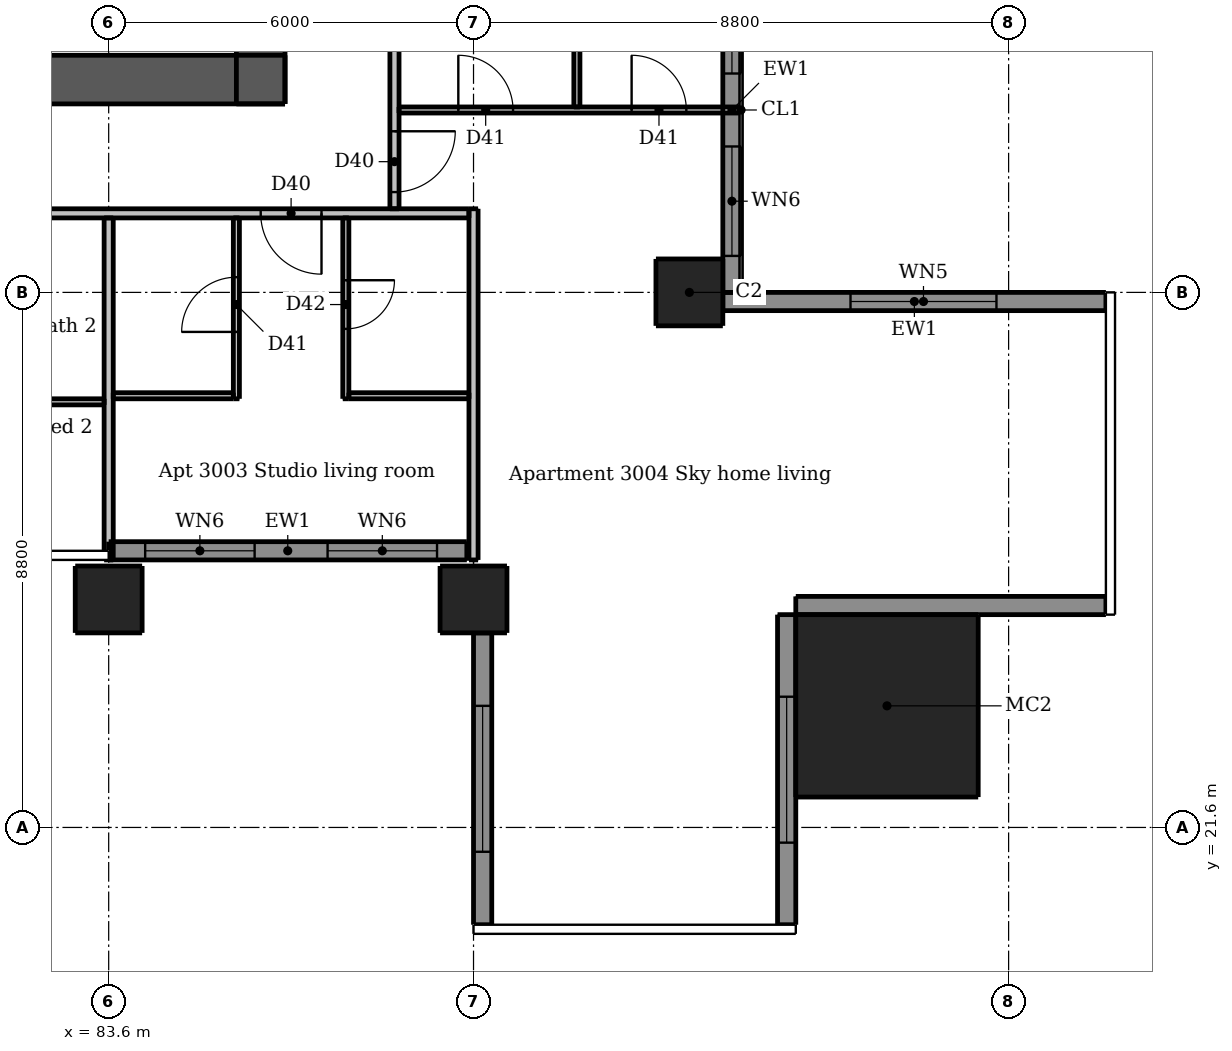
"""IFC4 building model, lengths in metres.
Left out: names, types, materials, properties, quantities, classifications, styles, units other than length and angle.
Written with IfcOpenShell. Run it as: python <this file> out.ifc"""

import sys

from ifc_helpers import new_model, si_unit, direction, frame, frame_2d, origin, origin_2d, place, context, subcontext, project, spatial, rectangle, extrude, element, fill, save


model = new_model("IFC4")
c1 = context("Model", 3, precision=1e-05, world=origin(), true_north=direction((0.0, 1.0)))
c2 = subcontext(c1, "Body", "Model", "MODEL_VIEW")
j1 = project(units=[si_unit("LENGTHUNIT", "METRE"), si_unit("PLANEANGLEUNIT", "RADIAN")], contexts=[c1])
p1 = place(None, origin())
s1 = spatial("IfcSite", under=j1, at=p1, CompositionType="ELEMENT")
p2 = place(p1, origin())
s2 = spatial("IfcBuilding", under=s1, at=p2, CompositionType="ELEMENT")
p3 = place(p2, frame((0.0, 0.0, 111.7)))
s3 = spatial("IfcBuildingStorey", under=s2, at=p3, CompositionType="ELEMENT", Elevation=111.7)
p4 = place(p3, frame((62.5, 33.9, 0.0), z_axis=(0.0, 0.0, 1.0), x_axis=(1.0, 0.0, 0.0)))
e1 = element("IfcWall", 1, at=p4, inside=s3, PredefinedType="SHEAR", context=c2, shape_type="SweptSolid", body=[
    extrude(rectangle(XDim=24.0, YDim=0.8, at=frame_2d((12.0, 0.0))), origin(), (0.0, 0.0, 1.0), 3.05),
])
p5 = place(p4, frame((2.0, 0.0, 0.0)))
e2 = element("IfcOpeningElement", 2, at=p5, cuts=e1, PredefinedType="OPENING", context=c2, shape_type="SweptSolid", body=[
    extrude(rectangle(XDim=1.1, YDim=2.1, at=frame_2d((0.55, 1.05))), frame((0.0, 0.41, 0.0), z_axis=(0.0, -1.0, 0.0), x_axis=(1.0, 0.0, 0.0)), (0.0, 0.0, 1.0), 0.82),
])
p6 = place(p4, frame((20.9, 0.0, 0.0)))
e3 = element("IfcOpeningElement", 3, at=p6, cuts=e1, PredefinedType="OPENING", context=c2, shape_type="SweptSolid", body=[
    extrude(rectangle(XDim=1.1, YDim=2.1, at=frame_2d((0.55, 1.05))), frame((0.0, 0.41, 0.0), z_axis=(0.0, -1.0, 0.0), x_axis=(1.0, 0.0, 0.0)), (0.0, 0.0, 1.0), 0.82),
])
p7 = place(p4, frame((8.0, 0.0, 0.0)))
e4 = element("IfcOpeningElement", 4, at=p7, cuts=e1, PredefinedType="OPENING", context=c2, shape_type="SweptSolid", body=[
    extrude(rectangle(XDim=1.1, YDim=2.1, at=frame_2d((0.55, 1.05))), frame((0.0, 0.41, 0.0), z_axis=(0.0, -1.0, 0.0), x_axis=(1.0, 0.0, 0.0)), (0.0, 0.0, 1.0), 0.82),
])
p8 = place(p4, frame((16.363, 0.0, 0.0)))
e5 = element("IfcOpeningElement", 5, at=p8, cuts=e1, PredefinedType="OPENING", context=c2, shape_type="SweptSolid", body=[
    extrude(rectangle(XDim=0.9, YDim=2.1, at=frame_2d((0.45, 1.05))), frame((0.0, 0.41, 0.0), z_axis=(0.0, -1.0, 0.0), x_axis=(1.0, 0.0, 0.0)), (0.0, 0.0, 1.0), 0.82),
])
p9 = place(p3, frame((86.1, 33.5, 0.0), z_axis=(0.0, 0.0, 1.0), x_axis=(0.0, 1.0, 0.0)))
e6 = element("IfcWall", 6, at=p9, inside=s3, PredefinedType="SHEAR", context=c2, shape_type="SweptSolid", body=[
    extrude(rectangle(XDim=24.0, YDim=0.8, at=frame_2d((12.0, 0.0))), origin(), (0.0, 0.0, 1.0), 3.05),
])
p10 = place(p9, frame((11.2, 0.0, 0.0)))
e7 = element("IfcOpeningElement", 7, at=p10, cuts=e6, PredefinedType="OPENING", context=c2, shape_type="SweptSolid", body=[
    extrude(rectangle(XDim=1.6, YDim=2.1, at=frame_2d((0.8, 1.05))), frame((0.0, 0.41, 0.0), z_axis=(0.0, -1.0, 0.0), x_axis=(1.0, 0.0, 0.0)), (0.0, 0.0, 1.0), 0.82),
])
for number, where, z_axis, x_axis in (
    (8, (83.6, 25.35, 0.0), (0.0, 0.0, 1.0), (1.0, 0.0, 0.0)),
    (9, (89.6, 25.35, 0.0), (0.0, 0.0, 1.0), (1.0, 0.0, 0.0)),
    (10, (93.15, 30.4, 0.0), (0.0, 0.0, 1.0), (1.0, 0.0, 0.0)),
):
    element("IfcColumn", number, at=place(p3, frame(where, z_axis=z_axis, x_axis=x_axis)), inside=s3, PredefinedType="COLUMN", context=c2, shape_type="SweptSolid", body=[
        extrude(rectangle(XDim=1.1, YDim=1.1, at=origin_2d()), origin(), (0.0, 0.0, 1.0), 3.05),
    ])
p11 = place(p3, frame((96.4, 23.6, 0.0), z_axis=(0.0, 0.0, 1.0), x_axis=(1.0, 0.0, 0.0)))
e11 = element("IfcColumn", 11, at=p11, inside=s3, PredefinedType="COLUMN", context=c2, shape_type="SweptSolid", body=[
    extrude(rectangle(XDim=3.0, YDim=3.0, at=origin_2d()), origin(), (0.0, 0.0, 1.0), 3.3),
])
p12 = place(p3, frame((89.75, 24.8, 0.0), z_axis=(0.0, 0.0, 1.0), x_axis=(0.0, -1.0, 0.0)))
e12 = element("IfcWall", 12, at=p12, inside=s3, PredefinedType="SOLIDWALL", context=c2, shape_type="SweptSolid", body=[
    extrude(rectangle(XDim=4.8, YDim=0.3, at=frame_2d((2.4, 0.0))), origin(), (0.0, 0.0, 1.0), 3.05),
])
p13 = place(p12, frame((1.2, 0.0, 0.15)))
e13 = element("IfcOpeningElement", 13, at=p13, cuts=e12, PredefinedType="OPENING", context=c2, shape_type="SweptSolid", body=[
    extrude(rectangle(XDim=2.4, YDim=2.1, at=frame_2d((1.2, 1.05))), frame((0.0, 0.16, 0.0), z_axis=(0.0, -1.0, 0.0), x_axis=(1.0, 0.0, 0.0)), (0.0, 0.0, 1.0), 0.32),
])
p14 = place(p3, frame((94.75, 20.0, 0.0), z_axis=(0.0, 0.0, 1.0), x_axis=(0.0, 1.0, 0.0)))
e14 = element("IfcWall", 14, at=p14, inside=s3, PredefinedType="SOLIDWALL", context=c2, shape_type="SweptSolid", body=[
    extrude(rectangle(XDim=5.1, YDim=0.3, at=frame_2d((2.55, 0.0))), origin(), (0.0, 0.0, 1.0), 3.05),
])
p15 = place(p14, frame((1.35, 0.0, 0.15)))
e15 = element("IfcOpeningElement", 15, at=p15, cuts=e14, PredefinedType="OPENING", context=c2, shape_type="SweptSolid", body=[
    extrude(rectangle(XDim=2.4, YDim=2.1, at=frame_2d((1.2, 1.05))), frame((0.0, 0.16, 0.0), z_axis=(0.0, -1.0, 0.0), x_axis=(1.0, 0.0, 0.0)), (0.0, 0.0, 1.0), 0.32),
])
p16 = place(p3, frame((94.9, 25.25, 0.0), z_axis=(0.0, 0.0, 1.0), x_axis=(1.0, 0.0, 0.0)))
e16 = element("IfcWall", 16, at=p16, inside=s3, PredefinedType="SOLIDWALL", context=c2, shape_type="SweptSolid", body=[
    extrude(rectangle(XDim=5.1, YDim=0.3, at=frame_2d((2.55, 0.0))), origin(), (0.0, 0.0, 1.0), 3.05),
])
p17 = place(p3, frame((100.0, 30.25, 0.0), z_axis=(0.0, 0.0, 1.0), x_axis=(-1.0, 0.0, 0.0)))
e17 = element("IfcWall", 17, at=p17, inside=s3, PredefinedType="SOLIDWALL", context=c2, shape_type="SweptSolid", body=[
    extrude(rectangle(XDim=6.3, YDim=0.3, at=frame_2d((3.15, 0.0))), origin(), (0.0, 0.0, 1.0), 3.05),
])
p18 = place(p17, frame((1.8, 0.0, 0.15)))
e18 = element("IfcOpeningElement", 18, at=p18, cuts=e17, PredefinedType="OPENING", context=c2, shape_type="SweptSolid", body=[
    extrude(rectangle(XDim=2.4, YDim=2.1, at=frame_2d((1.2, 1.05))), frame((0.0, 0.16, 0.0), z_axis=(0.0, -1.0, 0.0), x_axis=(1.0, 0.0, 0.0)), (0.0, 0.0, 1.0), 0.32),
])
p19 = place(p3, frame((83.6, 26.15, 0.0), z_axis=(0.0, 0.0, 1.0), x_axis=(1.0, 0.0, 0.0)))
e19 = element("IfcWall", 19, at=p19, inside=s3, PredefinedType="SOLIDWALL", context=c2, shape_type="SweptSolid", body=[
    extrude(rectangle(XDim=5.89, YDim=0.3, at=frame_2d((2.945, 0.0))), origin(), (0.0, 0.0, 1.0), 3.05),
])
p20 = place(p19, frame((0.6, 0.0, 0.15)))
e20 = element("IfcOpeningElement", 20, at=p20, cuts=e19, PredefinedType="OPENING", context=c2, shape_type="SweptSolid", body=[
    extrude(rectangle(XDim=1.8, YDim=2.1, at=frame_2d((0.9, 1.05))), frame((0.0, 0.16, 0.0), z_axis=(0.0, -1.0, 0.0), x_axis=(1.0, 0.0, 0.0)), (0.0, 0.0, 1.0), 0.32),
])
p21 = place(p19, frame((3.6, 0.0, 0.15)))
e21 = element("IfcOpeningElement", 21, at=p21, cuts=e19, PredefinedType="OPENING", context=c2, shape_type="SweptSolid", body=[
    extrude(rectangle(XDim=1.8, YDim=2.1, at=frame_2d((0.9, 1.05))), frame((0.0, 0.16, 0.0), z_axis=(0.0, -1.0, 0.0), x_axis=(1.0, 0.0, 0.0)), (0.0, 0.0, 1.0), 0.32),
])
p22 = place(p3, frame((93.85, 30.4, 0.0), z_axis=(0.0, 0.0, 1.0), x_axis=(0.0, 1.0, 0.0)))
e22 = element("IfcWall", 22, at=p22, inside=s3, PredefinedType="SOLIDWALL", context=c2, shape_type="SweptSolid", body=[
    extrude(rectangle(XDim=6.0, YDim=0.3, at=frame_2d((3.0, 0.0))), origin(), (0.0, 0.0, 1.0), 3.05),
])
p23 = place(p22, frame((0.6, 0.0, 0.15)))
e23 = element("IfcOpeningElement", 23, at=p23, cuts=e22, PredefinedType="OPENING", context=c2, shape_type="SweptSolid", body=[
    extrude(rectangle(XDim=1.8, YDim=2.1, at=frame_2d((0.9, 1.05))), frame((0.0, 0.16, 0.0), z_axis=(0.0, -1.0, 0.0), x_axis=(1.0, 0.0, 0.0)), (0.0, 0.0, 1.0), 0.32),
])
p24 = place(p22, frame((3.6, 0.0, 0.15)))
e24 = element("IfcOpeningElement", 24, at=p24, cuts=e22, PredefinedType="OPENING", context=c2, shape_type="SweptSolid", body=[
    extrude(rectangle(XDim=1.8, YDim=2.1, at=frame_2d((0.9, 1.05))), frame((0.0, 0.16, 0.0), z_axis=(0.0, -1.0, 0.0), x_axis=(1.0, 0.0, 0.0)), (0.0, 0.0, 1.0), 0.32),
])
p25 = place(p3, frame((85.7, 28.65, 0.0), z_axis=(0.0, 0.0, 1.0), x_axis=(0.0, 1.0, 0.0)))
e25 = element("IfcWall", 25, at=p25, inside=s3, PredefinedType="PARTITIONING", context=c2, shape_type="SweptSolid", body=[
    extrude(rectangle(XDim=2.975, YDim=0.1, at=frame_2d((1.488, 0.0))), origin(), (0.0, 0.0, 1.0), 3.05),
])
p26 = place(p25, frame((1.1, 0.0, 0.0)))
e26 = element("IfcOpeningElement", 26, at=p26, cuts=e25, PredefinedType="OPENING", context=c2, shape_type="SweptSolid", body=[
    extrude(rectangle(XDim=0.9, YDim=2.1, at=frame_2d((0.45, 1.05))), frame((0.0, 0.06, 0.0), z_axis=(0.0, -1.0, 0.0), x_axis=(1.0, 0.0, 0.0)), (0.0, 0.0, 1.0), 0.12),
])
p27 = place(p3, frame((87.5, 31.625, 0.0), z_axis=(0.0, 0.0, 1.0), x_axis=(0.0, -1.0, 0.0)))
e27 = element("IfcWall", 27, at=p27, inside=s3, PredefinedType="PARTITIONING", context=c2, shape_type="SweptSolid", body=[
    extrude(rectangle(XDim=2.975, YDim=0.1, at=frame_2d((1.488, 0.0))), origin(), (0.0, 0.0, 1.0), 3.05),
])
p28 = place(p27, frame((1.025, 0.0, 0.0)))
e28 = element("IfcOpeningElement", 28, at=p28, cuts=e27, PredefinedType="OPENING", context=c2, shape_type="SweptSolid", body=[
    extrude(rectangle(XDim=0.8, YDim=2.1, at=frame_2d((0.4, 1.05))), frame((0.0, 0.06, 0.0), z_axis=(0.0, -1.0, 0.0), x_axis=(1.0, 0.0, 0.0)), (0.0, 0.0, 1.0), 0.12),
])
p29 = place(p3, frame((91.3, 33.45, 0.0), z_axis=(0.0, 0.0, 1.0), x_axis=(0.0, 1.0, 0.0)))
e29 = element("IfcWall", 29, at=p29, inside=s3, PredefinedType="PARTITIONING", context=c2, shape_type="SweptSolid", body=[
    extrude(rectangle(XDim=5.875, YDim=0.1, at=frame_2d((2.938, 0.0))), origin(), (0.0, 0.0, 1.0), 3.05),
])
p30 = place(p29, frame((3.75, 0.0, 0.0)))
e30 = element("IfcOpeningElement", 30, at=p30, cuts=e29, PredefinedType="OPENING", context=c2, shape_type="SweptSolid", body=[
    extrude(rectangle(XDim=0.8, YDim=2.1, at=frame_2d((0.4, 1.05))), frame((0.0, 0.06, 0.0), z_axis=(0.0, -1.0, 0.0), x_axis=(1.0, 0.0, 0.0)), (0.0, 0.0, 1.0), 0.12),
])
p31 = place(p3, frame((88.375, 33.4, 0.0), z_axis=(0.0, 0.0, 1.0), x_axis=(1.0, 0.0, 0.0)))
e31 = element("IfcWall", 31, at=p31, inside=s3, PredefinedType="PARTITIONING", context=c2, shape_type="SweptSolid", body=[
    extrude(rectangle(XDim=5.625, YDim=0.1, at=frame_2d((2.812, 0.0))), origin(), (0.0, 0.0, 1.0), 3.05),
])
p32 = place(p31, frame((0.975, 0.0, 0.0)))
e32 = element("IfcOpeningElement", 32, at=p32, cuts=e31, PredefinedType="OPENING", context=c2, shape_type="SweptSolid", body=[
    extrude(rectangle(XDim=0.9, YDim=2.1, at=frame_2d((0.45, 1.05))), frame((0.0, 0.06, 0.0), z_axis=(0.0, -1.0, 0.0), x_axis=(1.0, 0.0, 0.0)), (0.0, 0.0, 1.0), 0.12),
])
p33 = place(p31, frame((3.825, 0.0, 0.0)))
e33 = element("IfcOpeningElement", 33, at=p33, cuts=e31, PredefinedType="OPENING", context=c2, shape_type="SweptSolid", body=[
    extrude(rectangle(XDim=0.9, YDim=2.1, at=frame_2d((0.45, 1.05))), frame((0.0, 0.06, 0.0), z_axis=(0.0, -1.0, 0.0), x_axis=(1.0, 0.0, 0.0)), (0.0, 0.0, 1.0), 0.12),
])
for number, where, z_axis, x_axis in (
    (34, (83.675, 28.7, 0.0), (0.0, 0.0, 1.0), (1.0, 0.0, 0.0)),
    (35, (87.55, 28.7, 0.0), (0.0, 0.0, 1.0), (1.0, 0.0, 0.0)),
):
    element("IfcWall", number, at=place(p3, frame(where, z_axis=z_axis, x_axis=x_axis)), inside=s3, PredefinedType="PARTITIONING", context=c2, shape_type="SweptSolid", body=[
        extrude(rectangle(XDim=1.975, YDim=0.1, at=frame_2d((0.987, 0.0))), origin(), (0.0, 0.0, 1.0), 3.05),
    ])
p34 = place(p3, frame((78.25, 28.6, 0.0), z_axis=(0.0, 0.0, 1.0), x_axis=(1.0, 0.0, 0.0)))
e36 = element("IfcWall", 36, at=p34, inside=s3, PredefinedType="PARTITIONING", context=c2, shape_type="SweptSolid", body=[
    extrude(rectangle(XDim=5.275, YDim=0.1, at=frame_2d((2.637, 0.0))), origin(), (0.0, 0.0, 1.0), 3.05),
])
p35 = place(p34, frame((3.45, 0.0, 0.0)))
e37 = element("IfcOpeningElement", 37, at=p35, cuts=e36, PredefinedType="OPENING", context=c2, shape_type="SweptSolid", body=[
    extrude(rectangle(XDim=0.8, YDim=2.1, at=frame_2d((0.4, 1.05))), frame((0.0, 0.06, 0.0), z_axis=(0.0, -1.0, 0.0), x_axis=(1.0, 0.0, 0.0)), (0.0, 0.0, 1.0), 0.12),
])
p36 = place(p3, frame((83.6, 26.0, 0.0), z_axis=(0.0, 0.0, 1.0), x_axis=(0.0, 1.0, 0.0)))
e38 = element("IfcWall", 38, at=p36, inside=s3, PredefinedType="PARTITIONING", context=c2, shape_type="SweptSolid", body=[
    extrude(rectangle(XDim=5.625, YDim=0.15, at=frame_2d((2.812, 0.0))), origin(), (0.0, 0.0, 1.0), 2.589),
])
p37 = place(p3, frame((88.3, 60.475, 0.0), z_axis=(0.0, 0.0, 1.0), x_axis=(0.0, -1.0, 0.0)))
e39 = element("IfcWall", 39, at=p37, inside=s3, PredefinedType="PARTITIONING", context=c2, shape_type="SweptSolid", body=[
    extrude(rectangle(XDim=28.7, YDim=0.15, at=frame_2d((14.35, 0.0))), origin(), (0.0, 0.0, 1.0), 3.05),
])
p38 = place(p37, frame((27.425, 0.0, 0.0)))
e40 = element("IfcOpeningElement", 40, at=p38, cuts=e39, PredefinedType="OPENING", context=c2, shape_type="SweptSolid", body=[
    extrude(rectangle(XDim=1.0, YDim=2.1, at=frame_2d((0.5, 1.05))), frame((0.0, 0.085, 0.0), z_axis=(0.0, -1.0, 0.0), x_axis=(1.0, 0.0, 0.0)), (0.0, 0.0, 1.0), 0.17),
])
p39 = place(p37, frame((14.575, 0.0, 0.0)))
e41 = element("IfcOpeningElement", 41, at=p39, cuts=e39, PredefinedType="OPENING", context=c2, shape_type="SweptSolid", body=[
    extrude(rectangle(XDim=1.0, YDim=2.1, at=frame_2d((0.5, 1.05))), frame((0.0, 0.085, 0.0), z_axis=(0.0, -1.0, 0.0), x_axis=(1.0, 0.0, 0.0)), (0.0, 0.0, 1.0), 0.17),
])
p40 = place(p37, frame((2.575, 0.0, 0.0)))
e42 = element("IfcOpeningElement", 42, at=p40, cuts=e39, PredefinedType="OPENING", context=c2, shape_type="SweptSolid", body=[
    extrude(rectangle(XDim=1.0, YDim=2.1, at=frame_2d((0.5, 1.05))), frame((0.0, 0.085, 0.0), z_axis=(0.0, -1.0, 0.0), x_axis=(1.0, 0.0, 0.0)), (0.0, 0.0, 1.0), 0.17),
])
p41 = place(p3, frame((89.6, 26.0, 0.0), z_axis=(0.0, 0.0, 1.0), x_axis=(0.0, 1.0, 0.0)))
e43 = element("IfcWall", 43, at=p41, inside=s3, PredefinedType="PARTITIONING", context=c2, shape_type="SweptSolid", body=[
    extrude(rectangle(XDim=5.775, YDim=0.15, at=frame_2d((2.887, 0.0))), origin(), (0.0, 0.0, 1.0), 2.516),
])
p42 = place(p3, frame((89.525, 31.7, 0.0), z_axis=(0.0, 0.0, 1.0), x_axis=(-1.0, 0.0, 0.0)))
e44 = element("IfcWall", 44, at=p42, inside=s3, PredefinedType="PARTITIONING", context=c2, shape_type="SweptSolid", body=[
    extrude(rectangle(XDim=28.75, YDim=0.15, at=frame_2d((14.375, 0.0))), origin(), (0.0, 0.0, 1.0), 3.05),
])
p43 = place(p42, frame((27.375, 0.0, 0.0)))
e45 = element("IfcOpeningElement", 45, at=p43, cuts=e44, PredefinedType="OPENING", context=c2, shape_type="SweptSolid", body=[
    extrude(rectangle(XDim=1.0, YDim=2.1, at=frame_2d((0.5, 1.05))), frame((0.0, 0.085, 0.0), z_axis=(0.0, -1.0, 0.0), x_axis=(1.0, 0.0, 0.0)), (0.0, 0.0, 1.0), 0.17),
])
p44 = place(p42, frame((12.625, 0.0, 0.0)))
e46 = element("IfcOpeningElement", 46, at=p44, cuts=e44, PredefinedType="OPENING", context=c2, shape_type="SweptSolid", body=[
    extrude(rectangle(XDim=1.0, YDim=2.1, at=frame_2d((0.5, 1.05))), frame((0.0, 0.085, 0.0), z_axis=(0.0, -1.0, 0.0), x_axis=(1.0, 0.0, 0.0)), (0.0, 0.0, 1.0), 0.17),
])
p45 = place(p42, frame((2.425, 0.0, 0.0)))
e47 = element("IfcOpeningElement", 47, at=p45, cuts=e44, PredefinedType="OPENING", context=c2, shape_type="SweptSolid", body=[
    extrude(rectangle(XDim=1.0, YDim=2.1, at=frame_2d((0.5, 1.05))), frame((0.0, 0.085, 0.0), z_axis=(0.0, -1.0, 0.0), x_axis=(1.0, 0.0, 0.0)), (0.0, 0.0, 1.0), 0.17),
])
p46 = place(p13, origin())
e48 = element("IfcWindow", 48, at=p46, inside=s3, PartitioningType="DOUBLE_PANEL_VERTICAL", PredefinedType="WINDOW", context=c2, shape_type="SweptSolid", body=[
    extrude(rectangle(XDim=2.4, YDim=2.1, at=frame_2d((1.2, 1.05))), frame((0.0, 0.03, 0.0), z_axis=(0.0, -1.0, 0.0), x_axis=(1.0, 0.0, 0.0)), (0.0, 0.0, 1.0), 0.06),
])
fill(e13, e48)
p47 = place(p15, origin())
e49 = element("IfcWindow", 49, at=p47, inside=s3, PartitioningType="DOUBLE_PANEL_VERTICAL", PredefinedType="WINDOW", context=c2, shape_type="SweptSolid", body=[
    extrude(rectangle(XDim=2.4, YDim=2.1, at=frame_2d((1.2, 1.05))), frame((0.0, 0.03, 0.0), z_axis=(0.0, -1.0, 0.0), x_axis=(1.0, 0.0, 0.0)), (0.0, 0.0, 1.0), 0.06),
])
fill(e15, e49)
p48 = place(p18, origin())
e50 = element("IfcWindow", 50, at=p48, inside=s3, PartitioningType="DOUBLE_PANEL_VERTICAL", PredefinedType="WINDOW", context=c2, shape_type="SweptSolid", body=[
    extrude(rectangle(XDim=2.4, YDim=2.1, at=frame_2d((1.2, 1.05))), frame((0.0, 0.03, 0.0), z_axis=(0.0, -1.0, 0.0), x_axis=(1.0, 0.0, 0.0)), (0.0, 0.0, 1.0), 0.06),
])
fill(e18, e50)
p49 = place(p20, origin())
e51 = element("IfcWindow", 51, at=p49, inside=s3, PartitioningType="DOUBLE_PANEL_VERTICAL", PredefinedType="WINDOW", context=c2, shape_type="SweptSolid", body=[
    extrude(rectangle(XDim=1.8, YDim=2.1, at=frame_2d((0.9, 1.05))), frame((0.0, 0.03, 0.0), z_axis=(0.0, -1.0, 0.0), x_axis=(1.0, 0.0, 0.0)), (0.0, 0.0, 1.0), 0.06),
])
fill(e20, e51)
p50 = place(p21, origin())
e52 = element("IfcWindow", 52, at=p50, inside=s3, PartitioningType="DOUBLE_PANEL_VERTICAL", PredefinedType="WINDOW", context=c2, shape_type="SweptSolid", body=[
    extrude(rectangle(XDim=1.8, YDim=2.1, at=frame_2d((0.9, 1.05))), frame((0.0, 0.03, 0.0), z_axis=(0.0, -1.0, 0.0), x_axis=(1.0, 0.0, 0.0)), (0.0, 0.0, 1.0), 0.06),
])
fill(e21, e52)
p51 = place(p23, origin())
e53 = element("IfcWindow", 53, at=p51, inside=s3, PartitioningType="DOUBLE_PANEL_VERTICAL", PredefinedType="WINDOW", context=c2, shape_type="SweptSolid", body=[
    extrude(rectangle(XDim=1.8, YDim=2.1, at=frame_2d((0.9, 1.05))), frame((0.0, 0.03, 0.0), z_axis=(0.0, -1.0, 0.0), x_axis=(1.0, 0.0, 0.0)), (0.0, 0.0, 1.0), 0.06),
])
fill(e23, e53)
p52 = place(p24, origin())
e54 = element("IfcWindow", 54, at=p52, inside=s3, PartitioningType="DOUBLE_PANEL_VERTICAL", PredefinedType="WINDOW", context=c2, shape_type="SweptSolid", body=[
    extrude(rectangle(XDim=1.8, YDim=2.1, at=frame_2d((0.9, 1.05))), frame((0.0, 0.03, 0.0), z_axis=(0.0, -1.0, 0.0), x_axis=(1.0, 0.0, 0.0)), (0.0, 0.0, 1.0), 0.06),
])
fill(e24, e54)
p53 = place(p6, origin())
e55 = element("IfcDoor", 55, at=p53, inside=s3, OperationType="SINGLE_SWING_RIGHT", PredefinedType="DOOR", context=c2, shape_type="SweptSolid", body=[
    extrude(rectangle(XDim=1.1, YDim=2.1, at=frame_2d((0.55, 1.05))), frame((0.0, 0.388, 0.0), z_axis=(0.0, -1.0, 0.0), x_axis=(1.0, 0.0, 0.0)), (0.0, 0.0, 1.0), 0.05),
])
fill(e3, e55)
p54 = place(p45, origin())
e56 = element("IfcDoor", 56, at=p54, inside=s3, OperationType="SINGLE_SWING_LEFT", PredefinedType="DOOR", context=c2, shape_type="SweptSolid", body=[
    extrude(rectangle(XDim=1.0, YDim=2.1, at=frame_2d((0.5, 1.05))), frame((0.0, 0.025, 0.0), z_axis=(0.0, -1.0, 0.0), x_axis=(1.0, 0.0, 0.0)), (0.0, 0.0, 1.0), 0.05),
])
fill(e47, e56)
p55 = place(p26, origin())
e57 = element("IfcDoor", 57, at=p55, inside=s3, OperationType="SINGLE_SWING_LEFT", PredefinedType="DOOR", context=c2, shape_type="SweptSolid", body=[
    extrude(rectangle(XDim=0.9, YDim=2.1, at=frame_2d((0.45, 1.05))), frame((0.0, 0.025, 0.0), z_axis=(0.0, -1.0, 0.0), x_axis=(1.0, 0.0, 0.0)), (0.0, 0.0, 1.0), 0.05),
])
fill(e26, e57)
p56 = place(p28, origin())
e58 = element("IfcDoor", 58, at=p56, inside=s3, OperationType="SINGLE_SWING_LEFT", PredefinedType="DOOR", context=c2, shape_type="SweptSolid", body=[
    extrude(rectangle(XDim=0.8, YDim=2.1, at=frame_2d((0.4, 1.05))), frame((0.0, 0.025, 0.0), z_axis=(0.0, -1.0, 0.0), x_axis=(1.0, 0.0, 0.0)), (0.0, 0.0, 1.0), 0.05),
])
fill(e28, e58)
p57 = place(p38, origin())
e59 = element("IfcDoor", 59, at=p57, inside=s3, OperationType="SINGLE_SWING_LEFT", PredefinedType="DOOR", context=c2, shape_type="SweptSolid", body=[
    extrude(rectangle(XDim=1.0, YDim=2.1, at=frame_2d((0.5, 1.05))), frame((0.0, 0.025, 0.0), z_axis=(0.0, -1.0, 0.0), x_axis=(1.0, 0.0, 0.0)), (0.0, 0.0, 1.0), 0.05),
])
fill(e40, e59)
p58 = place(p32, origin())
e60 = element("IfcDoor", 60, at=p58, inside=s3, OperationType="SINGLE_SWING_LEFT", PredefinedType="DOOR", context=c2, shape_type="SweptSolid", body=[
    extrude(rectangle(XDim=0.9, YDim=2.1, at=frame_2d((0.45, 1.05))), frame((0.0, 0.025, 0.0), z_axis=(0.0, -1.0, 0.0), x_axis=(1.0, 0.0, 0.0)), (0.0, 0.0, 1.0), 0.05),
])
fill(e32, e60)
p59 = place(p33, origin())
e61 = element("IfcDoor", 61, at=p59, inside=s3, OperationType="SINGLE_SWING_LEFT", PredefinedType="DOOR", context=c2, shape_type="SweptSolid", body=[
    extrude(rectangle(XDim=0.9, YDim=2.1, at=frame_2d((0.45, 1.05))), frame((0.0, 0.025, 0.0), z_axis=(0.0, -1.0, 0.0), x_axis=(1.0, 0.0, 0.0)), (0.0, 0.0, 1.0), 0.05),
])
fill(e33, e61)
save(model, sys.argv[1])
